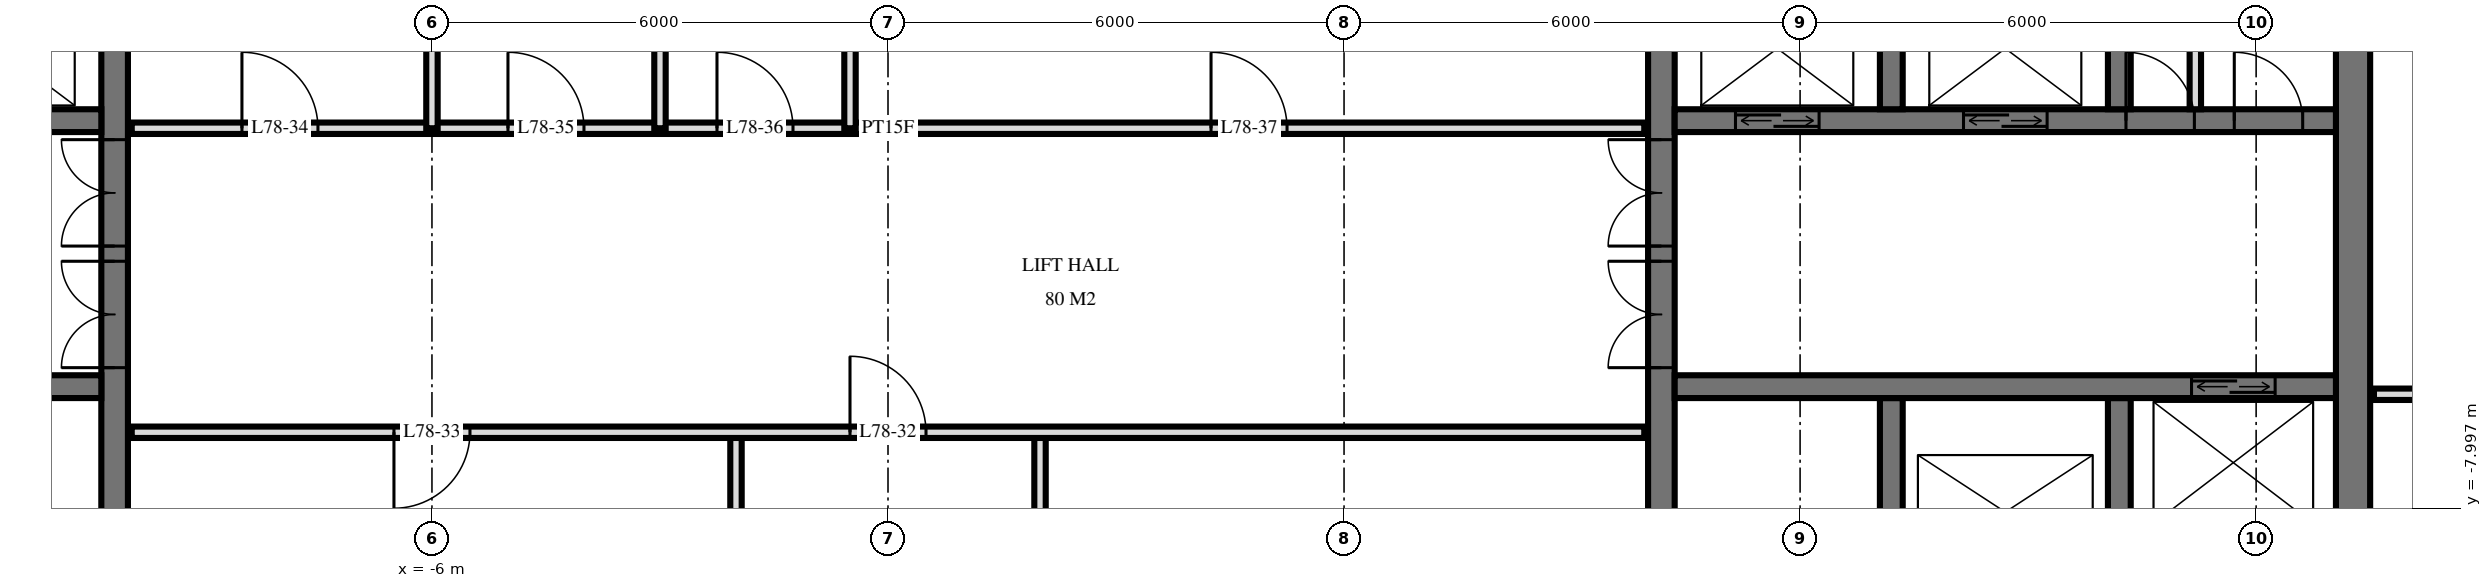
"""IFC4 building model, lengths in metres.
Left out: names, types, materials, properties, quantities, classifications, styles, units other than length and angle.
Written with IfcOpenShell. Run it as: python <this file> out.ifc"""

import sys

from ifc_helpers import new_model, si_unit, direction, frame, frame_2d, origin, place, context, subcontext, project, spatial, rectangle, extrude, element, fill, save


model = new_model("IFC4")
c1 = context("Model", 3, precision=1e-05, world=origin(), true_north=direction((0.0, 1.0)))
c2 = subcontext(c1, "Body", "Model", "MODEL_VIEW")
j1 = project(units=[si_unit("LENGTHUNIT", "METRE"), si_unit("PLANEANGLEUNIT", "RADIAN")], contexts=[c1])
p1 = place(None, origin())
s1 = spatial("IfcSite", under=j1, at=p1, CompositionType="ELEMENT")
p2 = place(p1, origin())
s2 = spatial("IfcBuilding", under=s1, at=p2, CompositionType="ELEMENT")
p3 = place(p2, frame((0.0, 0.0, 294.6)))
s3 = spatial("IfcBuildingStorey", under=s2, at=p3, CompositionType="ELEMENT", Elevation=294.6)
p4 = place(p3, frame((-10.175, -14.55, 0.0), z_axis=(0.0, 0.0, 1.0), x_axis=(0.0, 1.0, 0.0)))
e1 = element("IfcWall", 1, at=p4, inside=s3, PredefinedType="SHEAR", context=c2, shape_type="SweptSolid", body=[
    extrude(rectangle(XDim=14.1, YDim=0.35, at=frame_2d((7.05, 0.0))), origin(), (0.0, 0.0, 1.0), 3.5),
])
p5 = place(p4, frame((8.4, 0.0, 0.0)))
e2 = element("IfcOpeningElement", 2, at=p5, cuts=e1, PredefinedType="OPENING", context=c2, shape_type="SweptSolid", body=[
    extrude(rectangle(XDim=1.4, YDim=2.4, at=frame_2d((0.7, 1.2))), frame((0.0, 0.185, 0.0), z_axis=(0.0, -1.0, 0.0), x_axis=(1.0, 0.0, 0.0)), (0.0, 0.0, 1.0), 0.37),
])
p6 = place(p4, frame((10.0, 0.0, 0.0)))
e3 = element("IfcOpeningElement", 3, at=p6, cuts=e1, PredefinedType="OPENING", context=c2, shape_type="SweptSolid", body=[
    extrude(rectangle(XDim=1.4, YDim=2.4, at=frame_2d((0.7, 1.2))), frame((0.0, 0.185, 0.0), z_axis=(0.0, -1.0, 0.0), x_axis=(1.0, 0.0, 0.0)), (0.0, 0.0, 1.0), 0.37),
])
p7 = place(p4, frame((4.0, 0.0, 0.0)))
e4 = element("IfcOpeningElement", 4, at=p7, cuts=e1, PredefinedType="OPENING", context=c2, shape_type="SweptSolid", body=[
    extrude(rectangle(XDim=1.2, YDim=2.1, at=frame_2d((0.6, 1.05))), frame((0.0, 0.185, 0.0), z_axis=(0.0, -1.0, 0.0), x_axis=(1.0, 0.0, 0.0)), (0.0, 0.0, 1.0), 0.37),
])
p8 = place(p3, frame((-19.05, -2.9, 0.0), z_axis=(0.0, 0.0, 1.0), x_axis=(1.0, 0.0, 0.0)))
e5 = element("IfcWall", 5, at=p8, inside=s3, PredefinedType="SHEAR", context=c2, shape_type="SweptSolid", body=[
    extrude(rectangle(XDim=8.7, YDim=0.3, at=frame_2d((4.35, 0.0))), origin(), (0.0, 0.0, 1.0), 3.5),
])
p9 = place(p8, frame((6.8, 0.0, 0.0)))
e6 = element("IfcOpeningElement", 6, at=p9, cuts=e5, PredefinedType="OPENING", context=c2, shape_type="SweptSolid", body=[
    extrude(rectangle(XDim=1.1, YDim=2.1, at=frame_2d((0.55, 1.05))), frame((0.0, 0.16, 0.0), z_axis=(0.0, -1.0, 0.0), x_axis=(1.0, 0.0, 0.0)), (0.0, 0.0, 1.0), 0.32),
])
p10 = place(p8, frame((3.8, 0.0, 0.0)))
e7 = element("IfcOpeningElement", 7, at=p10, cuts=e5, PredefinedType="OPENING", context=c2, shape_type="SweptSolid", body=[
    extrude(rectangle(XDim=1.1, YDim=2.1, at=frame_2d((0.55, 1.05))), frame((0.0, 0.16, 0.0), z_axis=(0.0, -1.0, 0.0), x_axis=(1.0, 0.0, 0.0)), (0.0, 0.0, 1.0), 0.32),
])
p11 = place(p8, frame((1.863, 0.0, 0.0)))
e8 = element("IfcOpeningElement", 8, at=p11, cuts=e5, PredefinedType="OPENING", context=c2, shape_type="SweptSolid", body=[
    extrude(rectangle(XDim=0.9, YDim=2.1, at=frame_2d((0.45, 1.05))), frame((0.0, 0.16, 0.0), z_axis=(0.0, -1.0, 0.0), x_axis=(1.0, 0.0, 0.0)), (0.0, 0.0, 1.0), 0.32),
])
p12 = place(p8, frame((0.438, 0.0, 0.0)))
e9 = element("IfcOpeningElement", 9, at=p12, cuts=e5, PredefinedType="OPENING", context=c2, shape_type="SweptSolid", body=[
    extrude(rectangle(XDim=0.9, YDim=2.1, at=frame_2d((0.45, 1.05))), frame((0.0, 0.16, 0.0), z_axis=(0.0, -1.0, 0.0), x_axis=(1.0, 0.0, 0.0)), (0.0, 0.0, 1.0), 0.32),
])
p13 = place(p3, frame((-19.05, -6.4, 0.0), z_axis=(0.0, 0.0, 1.0), x_axis=(1.0, 0.0, 0.0)))
e10 = element("IfcWall", 10, at=p13, inside=s3, PredefinedType="SHEAR", context=c2, shape_type="SweptSolid", body=[
    extrude(rectangle(XDim=8.7, YDim=0.3, at=frame_2d((4.35, 0.0))), origin(), (0.0, 0.0, 1.0), 3.5),
])
p14 = place(p13, frame((0.8, 0.0, 0.0)))
e11 = element("IfcOpeningElement", 11, at=p14, cuts=e10, PredefinedType="OPENING", context=c2, shape_type="SweptSolid", body=[
    extrude(rectangle(XDim=1.1, YDim=2.1, at=frame_2d((0.55, 1.05))), frame((0.0, 0.16, 0.0), z_axis=(0.0, -1.0, 0.0), x_axis=(1.0, 0.0, 0.0)), (0.0, 0.0, 1.0), 0.32),
])
p15 = place(p3, frame((10.175, -14.55, 0.0), z_axis=(0.0, 0.0, 1.0), x_axis=(0.0, 1.0, 0.0)))
e12 = element("IfcWall", 12, at=p15, inside=s3, PredefinedType="SHEAR", context=c2, shape_type="SweptSolid", body=[
    extrude(rectangle(XDim=14.1, YDim=0.35, at=frame_2d((7.05, 0.0))), origin(), (0.0, 0.0, 1.0), 3.5),
])
p16 = place(p15, frame((8.4, 0.0, 0.0)))
e13 = element("IfcOpeningElement", 13, at=p16, cuts=e12, PredefinedType="OPENING", context=c2, shape_type="SweptSolid", body=[
    extrude(rectangle(XDim=1.4, YDim=2.4, at=frame_2d((0.7, 1.2))), frame((0.0, 0.185, 0.0), z_axis=(0.0, -1.0, 0.0), x_axis=(1.0, 0.0, 0.0)), (0.0, 0.0, 1.0), 0.37),
])
p17 = place(p15, frame((10.0, 0.0, 0.0)))
e14 = element("IfcOpeningElement", 14, at=p17, cuts=e12, PredefinedType="OPENING", context=c2, shape_type="SweptSolid", body=[
    extrude(rectangle(XDim=1.4, YDim=2.4, at=frame_2d((0.7, 1.2))), frame((0.0, 0.185, 0.0), z_axis=(0.0, -1.0, 0.0), x_axis=(1.0, 0.0, 0.0)), (0.0, 0.0, 1.0), 0.37),
])
p18 = place(p15, frame((4.0, 0.0, 0.0)))
e15 = element("IfcOpeningElement", 15, at=p18, cuts=e12, PredefinedType="OPENING", context=c2, shape_type="SweptSolid", body=[
    extrude(rectangle(XDim=1.2, YDim=2.1, at=frame_2d((0.6, 1.05))), frame((0.0, 0.185, 0.0), z_axis=(0.0, -1.0, 0.0), x_axis=(1.0, 0.0, 0.0)), (0.0, 0.0, 1.0), 0.37),
])
p19 = place(p3, frame((19.275, -14.55, 0.0), z_axis=(0.0, 0.0, 1.0), x_axis=(0.0, 1.0, 0.0)))
e16 = element("IfcWall", 16, at=p19, inside=s3, PredefinedType="SHEAR", context=c2, shape_type="SweptSolid", body=[
    extrude(rectangle(XDim=14.1, YDim=0.45, at=frame_2d((7.05, 0.0))), origin(), (0.0, 0.0, 1.0), 3.5),
])
p20 = place(p3, frame((10.35, -2.9, 0.0), z_axis=(0.0, 0.0, 1.0), x_axis=(1.0, 0.0, 0.0)))
e17 = element("IfcWall", 17, at=p20, inside=s3, PredefinedType="SHEAR", context=c2, shape_type="SweptSolid", body=[
    extrude(rectangle(XDim=8.7, YDim=0.3, at=frame_2d((4.35, 0.0))), origin(), (0.0, 0.0, 1.0), 3.5),
])
p21 = place(p20, frame((0.8, 0.0, 0.0)))
e18 = element("IfcOpeningElement", 18, at=p21, cuts=e17, PredefinedType="OPENING", context=c2, shape_type="SweptSolid", body=[
    extrude(rectangle(XDim=1.1, YDim=2.1, at=frame_2d((0.55, 1.05))), frame((0.0, 0.16, 0.0), z_axis=(0.0, -1.0, 0.0), x_axis=(1.0, 0.0, 0.0)), (0.0, 0.0, 1.0), 0.32),
])
p22 = place(p20, frame((3.8, 0.0, 0.0)))
e19 = element("IfcOpeningElement", 19, at=p22, cuts=e17, PredefinedType="OPENING", context=c2, shape_type="SweptSolid", body=[
    extrude(rectangle(XDim=1.1, YDim=2.1, at=frame_2d((0.55, 1.05))), frame((0.0, 0.16, 0.0), z_axis=(0.0, -1.0, 0.0), x_axis=(1.0, 0.0, 0.0)), (0.0, 0.0, 1.0), 0.32),
])
p23 = place(p20, frame((5.938, 0.0, 0.0)))
e20 = element("IfcOpeningElement", 20, at=p23, cuts=e17, PredefinedType="OPENING", context=c2, shape_type="SweptSolid", body=[
    extrude(rectangle(XDim=0.9, YDim=2.1, at=frame_2d((0.45, 1.05))), frame((0.0, 0.16, 0.0), z_axis=(0.0, -1.0, 0.0), x_axis=(1.0, 0.0, 0.0)), (0.0, 0.0, 1.0), 0.32),
])
p24 = place(p20, frame((7.363, 0.0, 0.0)))
e21 = element("IfcOpeningElement", 21, at=p24, cuts=e17, PredefinedType="OPENING", context=c2, shape_type="SweptSolid", body=[
    extrude(rectangle(XDim=0.9, YDim=2.1, at=frame_2d((0.45, 1.05))), frame((0.0, 0.16, 0.0), z_axis=(0.0, -1.0, 0.0), x_axis=(1.0, 0.0, 0.0)), (0.0, 0.0, 1.0), 0.32),
])
p25 = place(p3, frame((10.35, -6.4, 0.0), z_axis=(0.0, 0.0, 1.0), x_axis=(1.0, 0.0, 0.0)))
e22 = element("IfcWall", 22, at=p25, inside=s3, PredefinedType="SHEAR", context=c2, shape_type="SweptSolid", body=[
    extrude(rectangle(XDim=8.7, YDim=0.3, at=frame_2d((4.35, 0.0))), origin(), (0.0, 0.0, 1.0), 3.5),
])
p26 = place(p25, frame((6.8, 0.0, 0.0)))
e23 = element("IfcOpeningElement", 23, at=p26, cuts=e22, PredefinedType="OPENING", context=c2, shape_type="SweptSolid", body=[
    extrude(rectangle(XDim=1.1, YDim=2.1, at=frame_2d((0.55, 1.05))), frame((0.0, 0.16, 0.0), z_axis=(0.0, -1.0, 0.0), x_axis=(1.0, 0.0, 0.0)), (0.0, 0.0, 1.0), 0.32),
])
for number, where, z_axis, x_axis in (
    (24, (13.2, -2.75, 0.0), (0.0, 0.0, 1.0), (0.0, 1.0, 0.0)),
    (25, (13.2, -8.85, 0.0), (0.0, 0.0, 1.0), (0.0, 1.0, 0.0)),
    (26, (16.2, -2.75, 0.0), (0.0, 0.0, 1.0), (0.0, 1.0, 0.0)),
    (27, (16.2, -8.85, 0.0), (0.0, 0.0, 1.0), (0.0, 1.0, 0.0)),
):
    element("IfcWall", number, at=place(p3, frame(where, z_axis=z_axis, x_axis=x_axis)), inside=s3, PredefinedType="SHEAR", context=c2, shape_type="SweptSolid", body=[
        extrude(rectangle(XDim=2.3, YDim=0.3, at=frame_2d((1.15, 0.0))), origin(), (0.0, 0.0, 1.0), 3.5),
    ])
p27 = place(p3, frame((17.2, -2.75, 0.0), z_axis=(0.0, 0.0, 1.0), x_axis=(0.0, 1.0, 0.0)))
e28 = element("IfcWall", 28, at=p27, inside=s3, PredefinedType="PARTITIONING", context=c2, shape_type="SweptSolid", body=[
    extrude(rectangle(XDim=2.3, YDim=0.15, at=frame_2d((1.15, 0.0))), origin(), (0.0, 0.0, 1.0), 3.2),
])
p28 = place(p3, frame((2.0, -11.0, 0.0), z_axis=(0.0, 0.0, 1.0), x_axis=(0.0, 1.0, 0.0)))
e29 = element("IfcWall", 29, at=p28, inside=s3, PredefinedType="PARTITIONING", context=c2, shape_type="SweptSolid", body=[
    extrude(rectangle(XDim=4.0, YDim=0.15, at=frame_2d((2.0, 0.0))), origin(), (0.0, 0.0, 1.0), 3.22),
])
p29 = place(p3, frame((-0.5, -3.0, 0.0), z_axis=(0.0, 0.0, 1.0), x_axis=(0.0, 1.0, 0.0)))
e30 = element("IfcWall", 30, at=p29, inside=s3, PredefinedType="PLUMBINGWALL", context=c2, shape_type="SweptSolid", body=[
    extrude(rectangle(XDim=4.02, YDim=0.15, at=frame_2d((2.01, 0.0))), origin(), (0.0, 0.0, 1.0), 3.22),
])
p30 = place(p3, frame((-2.0, -11.0, 0.0), z_axis=(0.0, 0.0, 1.0), x_axis=(0.0, 1.0, 0.0)))
e31 = element("IfcWall", 31, at=p30, inside=s3, PredefinedType="PARTITIONING", context=c2, shape_type="SweptSolid", body=[
    extrude(rectangle(XDim=4.0, YDim=0.15, at=frame_2d((2.0, 0.0))), origin(), (0.0, 0.0, 1.0), 3.22),
])
for number, where, z_axis, x_axis in (
    (32, (-3.0, -3.0, 0.0), (0.0, 0.0, 1.0), (0.0, 1.0, 0.0)),
    (33, (-6.0, -3.0, 0.0), (0.0, 0.0, 1.0), (0.0, 1.0, 0.0)),
):
    element("IfcWall", number, at=place(p3, frame(where, z_axis=z_axis, x_axis=x_axis)), inside=s3, PredefinedType="PLUMBINGWALL", context=c2, shape_type="SweptSolid", body=[
        extrude(rectangle(XDim=4.02, YDim=0.15, at=frame_2d((2.01, 0.0))), origin(), (0.0, 0.0, 1.0), 3.22),
    ])
p31 = place(p3, frame((-9.95, -7.0, 0.0), z_axis=(0.0, 0.0, 1.0), x_axis=(1.0, 0.0, 0.0)))
e34 = element("IfcWall", 34, at=p31, inside=s3, PredefinedType="PARTITIONING", context=c2, shape_type="SweptSolid", body=[
    extrude(rectangle(XDim=19.9, YDim=0.15, at=frame_2d((9.95, 0.0))), origin(), (0.0, 0.0, 1.0), 3.22),
])
p32 = place(p31, frame((9.45, 0.0, 0.0)))
e35 = element("IfcOpeningElement", 35, at=p32, cuts=e34, PredefinedType="OPENING", context=c2, shape_type="SweptSolid", body=[
    extrude(rectangle(XDim=1.0, YDim=2.1, at=frame_2d((0.5, 1.05))), frame((0.0, 0.085, 0.0), z_axis=(0.0, -1.0, 0.0), x_axis=(1.0, 0.0, 0.0)), (0.0, 0.0, 1.0), 0.17),
])
p33 = place(p31, frame((3.45, 0.0, 0.0)))
e36 = element("IfcOpeningElement", 36, at=p33, cuts=e34, PredefinedType="OPENING", context=c2, shape_type="SweptSolid", body=[
    extrude(rectangle(XDim=1.0, YDim=2.1, at=frame_2d((0.5, 1.05))), frame((0.0, 0.085, 0.0), z_axis=(0.0, -1.0, 0.0), x_axis=(1.0, 0.0, 0.0)), (0.0, 0.0, 1.0), 0.17),
])
p34 = place(p3, frame((19.55, -6.5, 0.0), z_axis=(0.0, 0.0, 1.0), x_axis=(1.0, 0.0, 0.0)))
e37 = element("IfcWall", 37, at=p34, inside=s3, PredefinedType="PLUMBINGWALL", context=c2, shape_type="SweptSolid", body=[
    extrude(rectangle(XDim=3.37, YDim=0.15, at=frame_2d((1.685, 0.0))), origin(), (0.0, 0.0, 1.0), 3.22),
])
p35 = place(p34, frame((1.3, 0.0, 0.0)))
e38 = element("IfcOpeningElement", 38, at=p35, cuts=e37, PredefinedType="OPENING", context=c2, shape_type="SweptSolid", body=[
    extrude(rectangle(XDim=0.9, YDim=2.1, at=frame_2d((0.45, 1.05))), frame((0.0, 0.085, 0.0), z_axis=(0.0, -1.0, 0.0), x_axis=(1.0, 0.0, 0.0)), (0.0, 0.0, 1.0), 0.17),
])
p36 = place(p3, frame((-9.95, -3.0, 0.0), z_axis=(0.0, 0.0, 1.0), x_axis=(1.0, 0.0, 0.0)))
e39 = element("IfcWall", 39, at=p36, inside=s3, PredefinedType="PARTITIONING", context=c2, shape_type="SweptSolid", body=[
    extrude(rectangle(XDim=19.9, YDim=0.15, at=frame_2d((9.95, 0.0))), origin(), (0.0, 0.0, 1.0), 3.22),
])
p37 = place(p36, frame((1.45, 0.0, 0.0)))
e40 = element("IfcOpeningElement", 40, at=p37, cuts=e39, PredefinedType="OPENING", context=c2, shape_type="SweptSolid", body=[
    extrude(rectangle(XDim=1.0, YDim=2.1, at=frame_2d((0.5, 1.05))), frame((0.0, 0.085, 0.0), z_axis=(0.0, -1.0, 0.0), x_axis=(1.0, 0.0, 0.0)), (0.0, 0.0, 1.0), 0.17),
])
p38 = place(p36, frame((4.95, 0.0, 0.0)))
e41 = element("IfcOpeningElement", 41, at=p38, cuts=e39, PredefinedType="OPENING", context=c2, shape_type="SweptSolid", body=[
    extrude(rectangle(XDim=1.0, YDim=2.1, at=frame_2d((0.5, 1.05))), frame((0.0, 0.085, 0.0), z_axis=(0.0, -1.0, 0.0), x_axis=(1.0, 0.0, 0.0)), (0.0, 0.0, 1.0), 0.17),
])
p39 = place(p36, frame((7.7, 0.0, 0.0)))
e42 = element("IfcOpeningElement", 42, at=p39, cuts=e39, PredefinedType="OPENING", context=c2, shape_type="SweptSolid", body=[
    extrude(rectangle(XDim=1.0, YDim=2.1, at=frame_2d((0.5, 1.05))), frame((0.0, 0.085, 0.0), z_axis=(0.0, -1.0, 0.0), x_axis=(1.0, 0.0, 0.0)), (0.0, 0.0, 1.0), 0.17),
])
p40 = place(p36, frame((14.2, 0.0, 0.0)))
e43 = element("IfcOpeningElement", 43, at=p40, cuts=e39, PredefinedType="OPENING", context=c2, shape_type="SweptSolid", body=[
    extrude(rectangle(XDim=1.0, YDim=2.1, at=frame_2d((0.5, 1.05))), frame((0.0, 0.085, 0.0), z_axis=(0.0, -1.0, 0.0), x_axis=(1.0, 0.0, 0.0)), (0.0, 0.0, 1.0), 0.17),
])
p41 = place(p21, origin())
e44 = element("IfcDoor", 44, at=p41, inside=s3, OperationType="DOUBLE_DOOR_SLIDING", PredefinedType="USERDEFINED", context=c2, shape_type="SweptSolid", body=[
    extrude(rectangle(XDim=1.1, YDim=2.1, at=frame_2d((0.55, 1.05))), frame((0.0, 0.025, 0.0), z_axis=(0.0, -1.0, 0.0), x_axis=(1.0, 0.0, 0.0)), (0.0, 0.0, 1.0), 0.05),
])
fill(e18, e44)
p42 = place(p22, origin())
e45 = element("IfcDoor", 45, at=p42, inside=s3, OperationType="DOUBLE_DOOR_SLIDING", PredefinedType="USERDEFINED", context=c2, shape_type="SweptSolid", body=[
    extrude(rectangle(XDim=1.1, YDim=2.1, at=frame_2d((0.55, 1.05))), frame((0.0, 0.025, 0.0), z_axis=(0.0, -1.0, 0.0), x_axis=(1.0, 0.0, 0.0)), (0.0, 0.0, 1.0), 0.05),
])
fill(e19, e45)
p43 = place(p26, origin())
e46 = element("IfcDoor", 46, at=p43, inside=s3, OperationType="DOUBLE_DOOR_SLIDING", PredefinedType="USERDEFINED", context=c2, shape_type="SweptSolid", body=[
    extrude(rectangle(XDim=1.1, YDim=2.1, at=frame_2d((0.55, 1.05))), frame((0.0, 0.025, 0.0), z_axis=(0.0, -1.0, 0.0), x_axis=(1.0, 0.0, 0.0)), (0.0, 0.0, 1.0), 0.05),
])
fill(e23, e46)
p44 = place(p5, origin())
e47 = element("IfcDoor", 47, at=p44, inside=s3, OperationType="DOUBLE_DOOR_SINGLE_SWING", PredefinedType="DOOR", context=c2, shape_type="SweptSolid", body=[
    extrude(rectangle(XDim=1.4, YDim=2.4, at=frame_2d((0.7, 1.2))), frame((0.0, 0.025, 0.0), z_axis=(0.0, -1.0, 0.0), x_axis=(1.0, 0.0, 0.0)), (0.0, 0.0, 1.0), 0.05),
])
fill(e2, e47)
p45 = place(p6, origin())
e48 = element("IfcDoor", 48, at=p45, inside=s3, OperationType="DOUBLE_DOOR_SINGLE_SWING", PredefinedType="DOOR", context=c2, shape_type="SweptSolid", body=[
    extrude(rectangle(XDim=1.4, YDim=2.4, at=frame_2d((0.7, 1.2))), frame((0.0, 0.025, 0.0), z_axis=(0.0, -1.0, 0.0), x_axis=(1.0, 0.0, 0.0)), (0.0, 0.0, 1.0), 0.05),
])
fill(e3, e48)
p46 = place(p16, origin())
e49 = element("IfcDoor", 49, at=p46, inside=s3, OperationType="DOUBLE_DOOR_SINGLE_SWING", PredefinedType="DOOR", context=c2, shape_type="SweptSolid", body=[
    extrude(rectangle(XDim=1.4, YDim=2.4, at=frame_2d((0.7, 1.2))), frame((0.0, 0.025, 0.0), z_axis=(0.0, -1.0, 0.0), x_axis=(1.0, 0.0, 0.0)), (0.0, 0.0, 1.0), 0.05),
])
fill(e13, e49)
p47 = place(p17, origin())
e50 = element("IfcDoor", 50, at=p47, inside=s3, OperationType="DOUBLE_DOOR_SINGLE_SWING", PredefinedType="DOOR", context=c2, shape_type="SweptSolid", body=[
    extrude(rectangle(XDim=1.4, YDim=2.4, at=frame_2d((0.7, 1.2))), frame((0.0, 0.025, 0.0), z_axis=(0.0, -1.0, 0.0), x_axis=(1.0, 0.0, 0.0)), (0.0, 0.0, 1.0), 0.05),
])
fill(e14, e50)
p48 = place(p23, origin())
e51 = element("IfcDoor", 51, at=p48, inside=s3, OperationType="SINGLE_SWING_RIGHT", PredefinedType="DOOR", context=c2, shape_type="SweptSolid", body=[
    extrude(rectangle(XDim=0.9, YDim=2.1, at=frame_2d((0.45, 1.05))), frame((0.0, 0.025, 0.0), z_axis=(0.0, -1.0, 0.0), x_axis=(1.0, 0.0, 0.0)), (0.0, 0.0, 1.0), 0.05),
])
fill(e20, e51)
p49 = place(p24, origin())
e52 = element("IfcDoor", 52, at=p49, inside=s3, OperationType="SINGLE_SWING_RIGHT", PredefinedType="DOOR", context=c2, shape_type="SweptSolid", body=[
    extrude(rectangle(XDim=0.9, YDim=2.1, at=frame_2d((0.45, 1.05))), frame((0.0, 0.025, 0.0), z_axis=(0.0, -1.0, 0.0), x_axis=(1.0, 0.0, 0.0)), (0.0, 0.0, 1.0), 0.05),
])
fill(e21, e52)
p50 = place(p32, origin())
e53 = element("IfcDoor", 53, at=p50, inside=s3, OperationType="SINGLE_SWING_RIGHT", PredefinedType="DOOR", context=c2, shape_type="SweptSolid", body=[
    extrude(rectangle(XDim=1.0, YDim=2.1, at=frame_2d((0.5, 1.05))), frame((0.0, 0.025, 0.0), z_axis=(0.0, -1.0, 0.0), x_axis=(1.0, 0.0, 0.0)), (0.0, 0.0, 1.0), 0.05),
])
fill(e35, e53)
p51 = place(p33, frame((0.5, 0.0, 0.0), z_axis=(0.0, 0.0, 1.0), x_axis=(-1.0, 0.0, 0.0)))
e54 = element("IfcDoor", 54, at=p51, inside=s3, OperationType="SINGLE_SWING_LEFT", PredefinedType="DOOR", context=c2, shape_type="SweptSolid", body=[
    extrude(rectangle(XDim=1.0, YDim=2.1, at=frame_2d((0.0, 1.05))), frame((0.0, -0.025, 0.0), z_axis=(0.0, 1.0, 0.0), x_axis=(-1.0, 0.0, 0.0)), (0.0, 0.0, 1.0), 0.05),
])
fill(e36, e54)
p52 = place(p37, origin())
e55 = element("IfcDoor", 55, at=p52, inside=s3, OperationType="SINGLE_SWING_RIGHT", PredefinedType="DOOR", context=c2, shape_type="SweptSolid", body=[
    extrude(rectangle(XDim=1.0, YDim=2.1, at=frame_2d((0.5, 1.05))), frame((0.0, 0.025, 0.0), z_axis=(0.0, -1.0, 0.0), x_axis=(1.0, 0.0, 0.0)), (0.0, 0.0, 1.0), 0.05),
])
fill(e40, e55)
p53 = place(p38, origin())
e56 = element("IfcDoor", 56, at=p53, inside=s3, OperationType="SINGLE_SWING_RIGHT", PredefinedType="DOOR", context=c2, shape_type="SweptSolid", body=[
    extrude(rectangle(XDim=1.0, YDim=2.1, at=frame_2d((0.5, 1.05))), frame((0.0, 0.025, 0.0), z_axis=(0.0, -1.0, 0.0), x_axis=(1.0, 0.0, 0.0)), (0.0, 0.0, 1.0), 0.05),
])
fill(e41, e56)
p54 = place(p39, origin())
e57 = element("IfcDoor", 57, at=p54, inside=s3, OperationType="SINGLE_SWING_RIGHT", PredefinedType="DOOR", context=c2, shape_type="SweptSolid", body=[
    extrude(rectangle(XDim=1.0, YDim=2.1, at=frame_2d((0.5, 1.05))), frame((0.0, 0.025, 0.0), z_axis=(0.0, -1.0, 0.0), x_axis=(1.0, 0.0, 0.0)), (0.0, 0.0, 1.0), 0.05),
])
fill(e42, e57)
p55 = place(p40, origin())
e58 = element("IfcDoor", 58, at=p55, inside=s3, OperationType="SINGLE_SWING_RIGHT", PredefinedType="DOOR", context=c2, shape_type="SweptSolid", body=[
    extrude(rectangle(XDim=1.0, YDim=2.1, at=frame_2d((0.5, 1.05))), frame((0.0, 0.025, 0.0), z_axis=(0.0, -1.0, 0.0), x_axis=(1.0, 0.0, 0.0)), (0.0, 0.0, 1.0), 0.05),
])
fill(e43, e58)
save(model, sys.argv[1])
